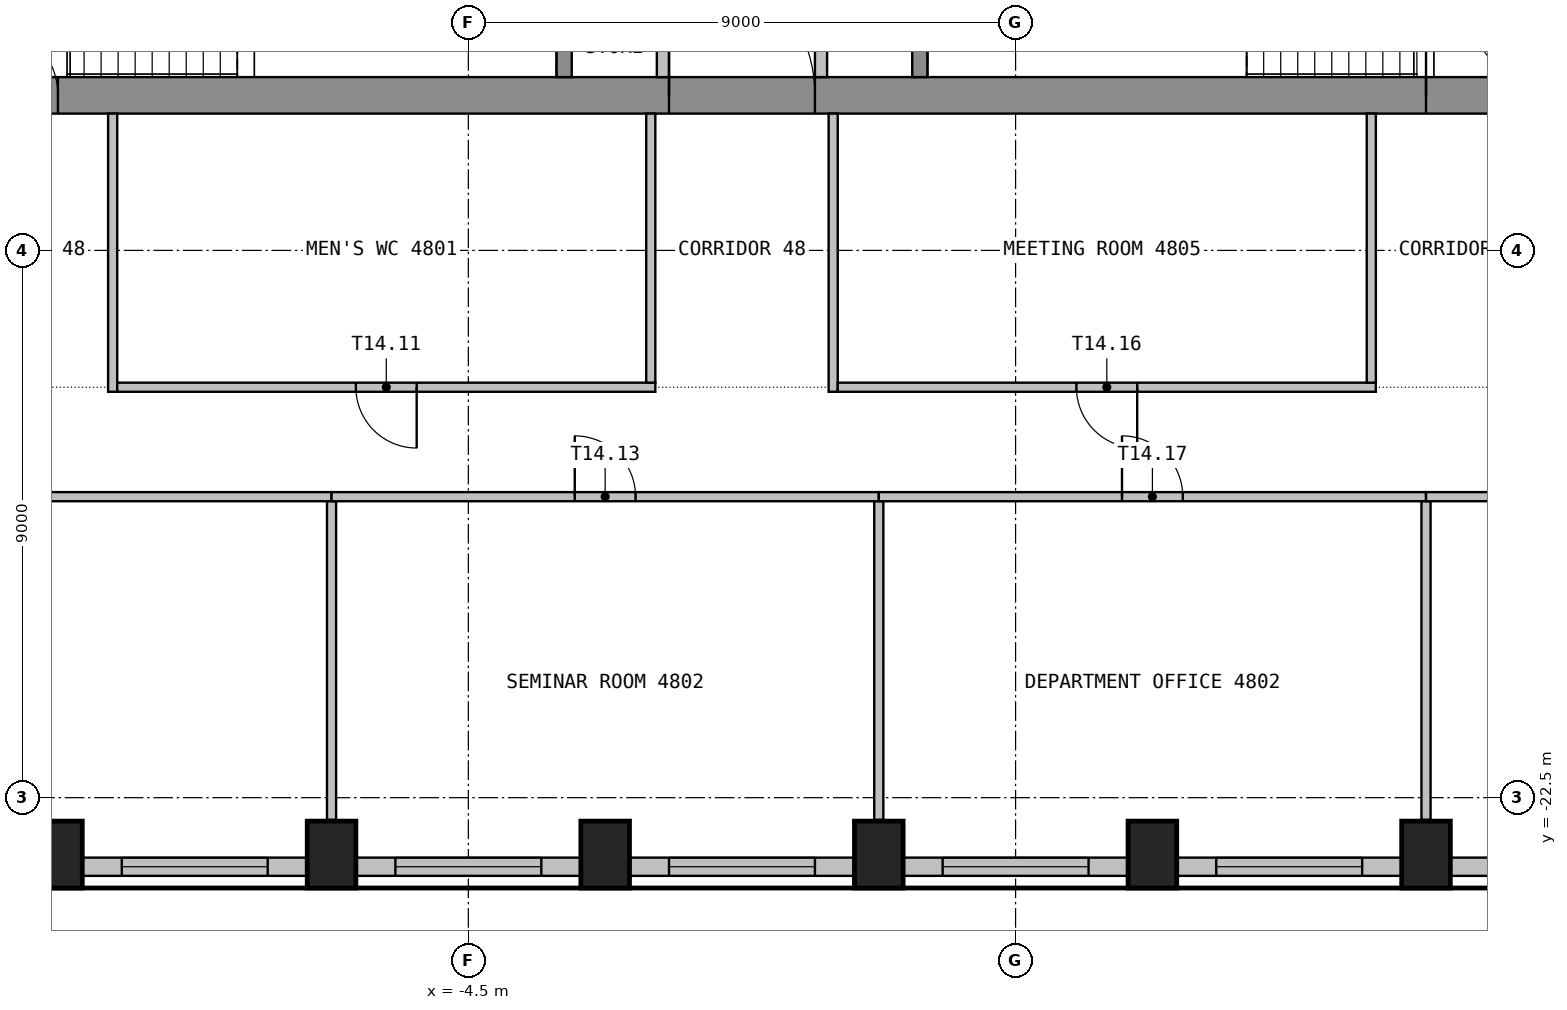
"""IFC4 building model, lengths in metres.
Left out: names, types, materials, properties, quantities, classifications, styles, units other than length and angle.
Written with IfcOpenShell. Run it as: python <this file> out.ifc"""

import sys

from ifc_helpers import new_model, si_unit, direction, frame, frame_2d, origin, origin_2d, place, context, subcontext, project, spatial, rectangle, extrude, element, fill, save


model = new_model("IFC4")
c1 = context("Model", 3, precision=1e-05, world=origin(), true_north=direction((0.0, 1.0)))
c2 = subcontext(c1, "Body", "Model", "MODEL_VIEW")
j1 = project(units=[si_unit("LENGTHUNIT", "METRE"), si_unit("PLANEANGLEUNIT", "RADIAN")], contexts=[c1])
p1 = place(None, origin())
s1 = spatial("IfcSite", under=j1, at=p1, CompositionType="ELEMENT")
p2 = place(p1, origin())
s2 = spatial("IfcBuilding", under=s1, at=p2, CompositionType="ELEMENT")
p3 = place(p2, frame((0.0, 0.0, 195.6)))
s3 = spatial("IfcBuildingStorey", under=s2, at=p3, CompositionType="ELEMENT", Elevation=195.6)
for number, where, z_axis, x_axis in (
    (1, (-11.25, -23.436, 0.0), (0.0, 0.0, 1.0), (1.0, 0.0, 0.0)),
    (2, (-6.75, -23.436, 0.0), (0.0, 0.0, 1.0), (1.0, 0.0, 0.0)),
    (3, (-2.25, -23.436, 0.0), (0.0, 0.0, 1.0), (1.0, 0.0, 0.0)),
    (4, (2.25, -23.436, 0.0), (0.0, 0.0, 1.0), (1.0, 0.0, 0.0)),
    (5, (6.75, -23.436, 0.0), (0.0, 0.0, 1.0), (1.0, 0.0, 0.0)),
    (6, (11.25, -23.436, 0.0), (0.0, 0.0, 1.0), (1.0, 0.0, 0.0)),
):
    element("IfcColumn", number, at=place(p3, frame(where, z_axis=z_axis, x_axis=x_axis)), inside=s3, PredefinedType="COLUMN", context=c2, shape_type="SweptSolid", body=[
        extrude(rectangle(XDim=0.8, YDim=1.1, at=origin_2d()), origin(), (0.0, 0.0, 1.0), 3.55),
    ])
p4 = place(p3, frame((-10.85, -23.635, 0.0), z_axis=(0.0, 0.0, 1.0), x_axis=(1.0, 0.0, 0.0)))
e7 = element("IfcWall", 7, at=p4, inside=s3, PredefinedType="SOLIDWALL", context=c2, shape_type="SweptSolid", body=[
    extrude(rectangle(XDim=3.699, YDim=0.3, at=frame_2d((1.85, 0.0))), origin(), (0.0, 0.0, 1.0), 3.55),
])
p5 = place(p4, frame((0.649, 0.0, 0.9)))
e8 = element("IfcOpeningElement", 8, at=p5, cuts=e7, PredefinedType="OPENING", context=c2, shape_type="SweptSolid", body=[
    extrude(rectangle(XDim=2.4, YDim=2.1, at=frame_2d((1.2, 1.05))), frame((0.0, 0.16, 0.0), z_axis=(0.0, -1.0, 0.0), x_axis=(1.0, 0.0, 0.0)), (0.0, 0.0, 1.0), 0.32),
])
p6 = place(p3, frame((-6.35, -23.635, 0.0), z_axis=(0.0, 0.0, 1.0), x_axis=(1.0, 0.0, 0.0)))
e9 = element("IfcWall", 9, at=p6, inside=s3, PredefinedType="SOLIDWALL", context=c2, shape_type="SweptSolid", body=[
    extrude(rectangle(XDim=3.699, YDim=0.3, at=frame_2d((1.85, 0.0))), origin(), (0.0, 0.0, 1.0), 3.55),
])
p7 = place(p6, frame((0.649, 0.0, 0.9)))
e10 = element("IfcOpeningElement", 10, at=p7, cuts=e9, PredefinedType="OPENING", context=c2, shape_type="SweptSolid", body=[
    extrude(rectangle(XDim=2.4, YDim=2.1, at=frame_2d((1.2, 1.05))), frame((0.0, 0.16, 0.0), z_axis=(0.0, -1.0, 0.0), x_axis=(1.0, 0.0, 0.0)), (0.0, 0.0, 1.0), 0.32),
])
p8 = place(p3, frame((-1.85, -23.635, 0.0), z_axis=(0.0, 0.0, 1.0), x_axis=(1.0, 0.0, 0.0)))
e11 = element("IfcWall", 11, at=p8, inside=s3, PredefinedType="SOLIDWALL", context=c2, shape_type="SweptSolid", body=[
    extrude(rectangle(XDim=3.699, YDim=0.3, at=frame_2d((1.85, 0.0))), origin(), (0.0, 0.0, 1.0), 3.55),
])
p9 = place(p8, frame((0.649, 0.0, 0.9)))
e12 = element("IfcOpeningElement", 12, at=p9, cuts=e11, PredefinedType="OPENING", context=c2, shape_type="SweptSolid", body=[
    extrude(rectangle(XDim=2.4, YDim=2.1, at=frame_2d((1.2, 1.05))), frame((0.0, 0.16, 0.0), z_axis=(0.0, -1.0, 0.0), x_axis=(1.0, 0.0, 0.0)), (0.0, 0.0, 1.0), 0.32),
])
p10 = place(p3, frame((2.65, -23.635, 0.0), z_axis=(0.0, 0.0, 1.0), x_axis=(1.0, 0.0, 0.0)))
e13 = element("IfcWall", 13, at=p10, inside=s3, PredefinedType="SOLIDWALL", context=c2, shape_type="SweptSolid", body=[
    extrude(rectangle(XDim=3.699, YDim=0.3, at=frame_2d((1.85, 0.0))), origin(), (0.0, 0.0, 1.0), 3.55),
])
p11 = place(p10, frame((0.649, 0.0, 0.9)))
e14 = element("IfcOpeningElement", 14, at=p11, cuts=e13, PredefinedType="OPENING", context=c2, shape_type="SweptSolid", body=[
    extrude(rectangle(XDim=2.4, YDim=2.1, at=frame_2d((1.2, 1.05))), frame((0.0, 0.16, 0.0), z_axis=(0.0, -1.0, 0.0), x_axis=(1.0, 0.0, 0.0)), (0.0, 0.0, 1.0), 0.32),
])
p12 = place(p3, frame((7.15, -23.635, 0.0), z_axis=(0.0, 0.0, 1.0), x_axis=(1.0, 0.0, 0.0)))
e15 = element("IfcWall", 15, at=p12, inside=s3, PredefinedType="SOLIDWALL", context=c2, shape_type="SweptSolid", body=[
    extrude(rectangle(XDim=3.699, YDim=0.3, at=frame_2d((1.85, 0.0))), origin(), (0.0, 0.0, 1.0), 3.55),
])
p13 = place(p12, frame((0.649, 0.0, 0.9)))
e16 = element("IfcOpeningElement", 16, at=p13, cuts=e15, PredefinedType="OPENING", context=c2, shape_type="SweptSolid", body=[
    extrude(rectangle(XDim=2.4, YDim=2.1, at=frame_2d((1.2, 1.05))), frame((0.0, 0.16, 0.0), z_axis=(0.0, -1.0, 0.0), x_axis=(1.0, 0.0, 0.0)), (0.0, 0.0, 1.0), 0.32),
])
p14 = place(p3, frame((11.65, -23.635, 0.0), z_axis=(0.0, 0.0, 1.0), x_axis=(1.0, 0.0, 0.0)))
e17 = element("IfcWall", 17, at=p14, inside=s3, PredefinedType="SOLIDWALL", context=c2, shape_type="SweptSolid", body=[
    extrude(rectangle(XDim=3.396, YDim=0.3, at=frame_2d((1.698, 0.0))), origin(), (0.0, 0.0, 1.0), 3.55),
])
p15 = place(p14, frame((0.649, 0.0, 0.9)))
e18 = element("IfcOpeningElement", 18, at=p15, cuts=e17, PredefinedType="OPENING", context=c2, shape_type="SweptSolid", body=[
    extrude(rectangle(XDim=2.4, YDim=2.1, at=frame_2d((1.2, 1.05))), frame((0.0, 0.16, 0.0), z_axis=(0.0, -1.0, 0.0), x_axis=(1.0, 0.0, 0.0)), (0.0, 0.0, 1.0), 0.32),
])
p16 = place(p3, frame((-13.5, -10.95, 0.0), z_axis=(0.0, 0.0, 1.0), x_axis=(1.0, 0.0, 0.0)))
e19 = element("IfcWall", 19, at=p16, inside=s3, PredefinedType="SHEAR", context=c2, shape_type="SweptSolid", body=[
    extrude(rectangle(XDim=27.0, YDim=0.6, at=frame_2d((13.5, 0.0))), origin(), (0.0, 0.0, 1.0), 3.55),
])
p17 = place(p16, frame((12.3, 0.0, 0.0)))
e20 = element("IfcOpeningElement", 20, at=p17, cuts=e19, PredefinedType="OPENING", context=c2, shape_type="SweptSolid", body=[
    extrude(rectangle(XDim=2.4, YDim=2.1, at=frame_2d((1.2, 1.05))), frame((0.0, 0.31, 0.0), z_axis=(0.0, -1.0, 0.0), x_axis=(1.0, 0.0, 0.0)), (0.0, 0.0, 1.0), 0.62),
])
p18 = place(p16, frame((1.05, 0.0, 0.0)))
e21 = element("IfcOpeningElement", 21, at=p18, cuts=e19, PredefinedType="OPENING", context=c2, shape_type="SweptSolid", body=[
    extrude(rectangle(XDim=1.2, YDim=2.1, at=frame_2d((0.6, 1.05))), frame((0.0, 0.31, 0.0), z_axis=(0.0, -1.0, 0.0), x_axis=(1.0, 0.0, 0.0)), (0.0, 0.0, 1.0), 0.62),
])
p19 = place(p16, frame((24.75, 0.0, 0.0)))
e22 = element("IfcOpeningElement", 22, at=p19, cuts=e19, PredefinedType="OPENING", context=c2, shape_type="SweptSolid", body=[
    extrude(rectangle(XDim=1.2, YDim=2.1, at=frame_2d((0.6, 1.05))), frame((0.0, 0.31, 0.0), z_axis=(0.0, -1.0, 0.0), x_axis=(1.0, 0.0, 0.0)), (0.0, 0.0, 1.0), 0.62),
])
for number, where, z_axis, x_axis in (
    (23, (-2.925, -10.65, 0.0), (0.0, 0.0, 1.0), (0.0, 1.0, 0.0)),
    (24, (2.925, -10.65, 0.0), (0.0, 0.0, 1.0), (0.0, 1.0, 0.0)),
):
    element("IfcWall", number, at=place(p3, frame(where, z_axis=z_axis, x_axis=x_axis)), inside=s3, PredefinedType="SHEAR", context=c2, shape_type="SweptSolid", body=[
        extrude(rectangle(XDim=3.25, YDim=0.25, at=frame_2d((1.625, 0.0))), origin(), (0.0, 0.0, 1.0), 3.55),
    ])
p20 = place(p3, frame((-1.3, -10.65, 0.0), z_axis=(0.0, 0.0, 1.0), x_axis=(0.0, 1.0, 0.0)))
e25 = element("IfcWall", 25, at=p20, inside=s3, PredefinedType="PARTITIONING", context=c2, shape_type="SweptSolid", body=[
    extrude(rectangle(XDim=3.5, YDim=0.2, at=frame_2d((1.75, 0.0))), origin(), (0.0, 0.0, 1.0), 3.55),
])
p21 = place(p20, frame((1.2, 0.0, 0.0)))
e26 = element("IfcOpeningElement", 26, at=p21, cuts=e25, PredefinedType="OPENING", context=c2, shape_type="SweptSolid", body=[
    extrude(rectangle(XDim=0.9, YDim=2.1, at=frame_2d((0.45, 1.05))), frame((0.0, 0.11, 0.0), z_axis=(0.0, -1.0, 0.0), x_axis=(1.0, 0.0, 0.0)), (0.0, 0.0, 1.0), 0.22),
])
p22 = place(p3, frame((1.3, -10.65, 0.0), z_axis=(0.0, 0.0, 1.0), x_axis=(0.0, 1.0, 0.0)))
e27 = element("IfcWall", 27, at=p22, inside=s3, PredefinedType="PARTITIONING", context=c2, shape_type="SweptSolid", body=[
    extrude(rectangle(XDim=3.5, YDim=0.2, at=frame_2d((1.75, 0.0))), origin(), (0.0, 0.0, 1.0), 3.55),
])
p23 = place(p22, frame((1.2, 0.0, 0.0)))
e28 = element("IfcOpeningElement", 28, at=p23, cuts=e27, PredefinedType="OPENING", context=c2, shape_type="SweptSolid", body=[
    extrude(rectangle(XDim=0.9, YDim=2.1, at=frame_2d((0.45, 1.05))), frame((0.0, 0.11, 0.0), z_axis=(0.0, -1.0, 0.0), x_axis=(1.0, 0.0, 0.0)), (0.0, 0.0, 1.0), 0.22),
])
p24 = place(p3, frame((-19.725, -17.55, 0.0), z_axis=(0.0, 0.0, 1.0), x_axis=(1.0, 0.0, 0.0)))
e29 = element("IfcWall", 29, at=p24, inside=s3, PredefinedType="PARTITIONING", context=c2, shape_type="SweptSolid", body=[
    extrude(rectangle(XDim=12.975, YDim=0.15, at=frame_2d((6.488, 0.0))), origin(), (0.0, 0.0, 1.0), 3.55),
])
p25 = place(p24, frame((5.988, 0.0, 0.0)))
e30 = element("IfcOpeningElement", 30, at=p25, cuts=e29, PredefinedType="OPENING", context=c2, shape_type="SweptSolid", body=[
    extrude(rectangle(XDim=1.0, YDim=2.1, at=frame_2d((0.5, 1.05))), frame((0.0, 0.085, 0.0), z_axis=(0.0, -1.0, 0.0), x_axis=(1.0, 0.0, 0.0)), (0.0, 0.0, 1.0), 0.17),
])
p26 = place(p3, frame((-10.35, -15.825, 0.0), z_axis=(0.0, 0.0, 1.0), x_axis=(0.0, 1.0, 0.0)))
e31 = element("IfcWall", 31, at=p26, inside=s3, PredefinedType="PARTITIONING", context=c2, shape_type="SweptSolid", body=[
    extrude(rectangle(XDim=4.575, YDim=0.15, at=frame_2d((2.288, 0.0))), origin(), (0.0, 0.0, 1.0), 3.55),
])
p27 = place(p3, frame((-1.425, -15.75, 0.0), z_axis=(0.0, 0.0, 1.0), x_axis=(-1.0, 0.0, 0.0)))
e32 = element("IfcWall", 32, at=p27, inside=s3, PredefinedType="PARTITIONING", context=c2, shape_type="SweptSolid", body=[
    extrude(rectangle(XDim=8.85, YDim=0.15, at=frame_2d((4.425, 0.0))), origin(), (0.0, 0.0, 1.0), 3.55),
])
p28 = place(p27, frame((3.925, 0.0, 0.0)))
e33 = element("IfcOpeningElement", 33, at=p28, cuts=e32, PredefinedType="OPENING", context=c2, shape_type="SweptSolid", body=[
    extrude(rectangle(XDim=1.0, YDim=2.1, at=frame_2d((0.5, 1.05))), frame((0.0, 0.085, 0.0), z_axis=(0.0, -1.0, 0.0), x_axis=(1.0, 0.0, 0.0)), (0.0, 0.0, 1.0), 0.17),
])
p29 = place(p3, frame((-6.75, -17.625, 0.0), z_axis=(0.0, 0.0, 1.0), x_axis=(0.0, -1.0, 0.0)))
e34 = element("IfcWall", 34, at=p29, inside=s3, PredefinedType="PARTITIONING", context=c2, shape_type="SweptSolid", body=[
    extrude(rectangle(XDim=5.24, YDim=0.15, at=frame_2d((2.62, 0.0))), origin(), (0.0, 0.0, 1.0), 3.55),
])
p30 = place(p3, frame((-6.75, -17.55, 0.0), z_axis=(0.0, 0.0, 1.0), x_axis=(1.0, 0.0, 0.0)))
e35 = element("IfcWall", 35, at=p30, inside=s3, PredefinedType="PARTITIONING", context=c2, shape_type="SweptSolid", body=[
    extrude(rectangle(XDim=9.0, YDim=0.15, at=frame_2d((4.5, 0.0))), origin(), (0.0, 0.0, 1.0), 3.55),
])
p31 = place(p30, frame((4.0, 0.0, 0.0)))
e36 = element("IfcOpeningElement", 36, at=p31, cuts=e35, PredefinedType="OPENING", context=c2, shape_type="SweptSolid", body=[
    extrude(rectangle(XDim=1.0, YDim=2.1, at=frame_2d((0.5, 1.05))), frame((0.0, 0.085, 0.0), z_axis=(0.0, -1.0, 0.0), x_axis=(1.0, 0.0, 0.0)), (0.0, 0.0, 1.0), 0.17),
])
p32 = place(p3, frame((-1.5, -11.25, 0.0), z_axis=(0.0, 0.0, 1.0), x_axis=(0.0, -1.0, 0.0)))
e37 = element("IfcWall", 37, at=p32, inside=s3, PredefinedType="PARTITIONING", context=c2, shape_type="SweptSolid", body=[
    extrude(rectangle(XDim=4.425, YDim=0.15, at=frame_2d((2.212, 0.0))), origin(), (0.0, 0.0, 1.0), 3.55),
])
p33 = place(p3, frame((1.5, -15.825, 0.0), z_axis=(0.0, 0.0, 1.0), x_axis=(0.0, 1.0, 0.0)))
e38 = element("IfcWall", 38, at=p33, inside=s3, PredefinedType="PARTITIONING", context=c2, shape_type="SweptSolid", body=[
    extrude(rectangle(XDim=4.575, YDim=0.15, at=frame_2d((2.288, 0.0))), origin(), (0.0, 0.0, 1.0), 3.55),
])
p34 = place(p3, frame((10.425, -15.75, 0.0), z_axis=(0.0, 0.0, 1.0), x_axis=(-1.0, 0.0, 0.0)))
e39 = element("IfcWall", 39, at=p34, inside=s3, PredefinedType="PARTITIONING", context=c2, shape_type="SweptSolid", body=[
    extrude(rectangle(XDim=8.85, YDim=0.15, at=frame_2d((4.425, 0.0))), origin(), (0.0, 0.0, 1.0), 3.55),
])
p35 = place(p34, frame((3.925, 0.0, 0.0)))
e40 = element("IfcOpeningElement", 40, at=p35, cuts=e39, PredefinedType="OPENING", context=c2, shape_type="SweptSolid", body=[
    extrude(rectangle(XDim=1.0, YDim=2.1, at=frame_2d((0.5, 1.05))), frame((0.0, 0.085, 0.0), z_axis=(0.0, -1.0, 0.0), x_axis=(1.0, 0.0, 0.0)), (0.0, 0.0, 1.0), 0.17),
])
p36 = place(p3, frame((2.25, -17.625, 0.0), z_axis=(0.0, 0.0, 1.0), x_axis=(0.0, -1.0, 0.0)))
e41 = element("IfcWall", 41, at=p36, inside=s3, PredefinedType="PARTITIONING", context=c2, shape_type="SweptSolid", body=[
    extrude(rectangle(XDim=5.24, YDim=0.15, at=frame_2d((2.62, 0.0))), origin(), (0.0, 0.0, 1.0), 3.55),
])
p37 = place(p3, frame((2.25, -17.55, 0.0), z_axis=(0.0, 0.0, 1.0), x_axis=(1.0, 0.0, 0.0)))
e42 = element("IfcWall", 42, at=p37, inside=s3, PredefinedType="PARTITIONING", context=c2, shape_type="SweptSolid", body=[
    extrude(rectangle(XDim=9.0, YDim=0.15, at=frame_2d((4.5, 0.0))), origin(), (0.0, 0.0, 1.0), 3.55),
])
p38 = place(p37, frame((4.0, 0.0, 0.0)))
e43 = element("IfcOpeningElement", 43, at=p38, cuts=e42, PredefinedType="OPENING", context=c2, shape_type="SweptSolid", body=[
    extrude(rectangle(XDim=1.0, YDim=2.1, at=frame_2d((0.5, 1.05))), frame((0.0, 0.085, 0.0), z_axis=(0.0, -1.0, 0.0), x_axis=(1.0, 0.0, 0.0)), (0.0, 0.0, 1.0), 0.17),
])
p39 = place(p3, frame((10.35, -11.25, 0.0), z_axis=(0.0, 0.0, 1.0), x_axis=(0.0, -1.0, 0.0)))
e44 = element("IfcWall", 44, at=p39, inside=s3, PredefinedType="PARTITIONING", context=c2, shape_type="SweptSolid", body=[
    extrude(rectangle(XDim=4.425, YDim=0.15, at=frame_2d((2.212, 0.0))), origin(), (0.0, 0.0, 1.0), 3.55),
])
p40 = place(p3, frame((11.25, -17.625, 0.0), z_axis=(0.0, 0.0, 1.0), x_axis=(0.0, -1.0, 0.0)))
e45 = element("IfcWall", 45, at=p40, inside=s3, PredefinedType="PARTITIONING", context=c2, shape_type="SweptSolid", body=[
    extrude(rectangle(XDim=5.24, YDim=0.15, at=frame_2d((2.62, 0.0))), origin(), (0.0, 0.0, 1.0), 3.55),
])
p41 = place(p3, frame((11.25, -17.55, 0.0), z_axis=(0.0, 0.0, 1.0), x_axis=(1.0, 0.0, 0.0)))
e46 = element("IfcWall", 46, at=p41, inside=s3, PredefinedType="PARTITIONING", context=c2, shape_type="SweptSolid", body=[
    extrude(rectangle(XDim=8.625, YDim=0.15, at=frame_2d((4.312, 0.0))), origin(), (0.0, 0.0, 1.0), 3.55),
])
p42 = place(p41, frame((3.812, 0.0, 0.0)))
e47 = element("IfcOpeningElement", 47, at=p42, cuts=e46, PredefinedType="OPENING", context=c2, shape_type="SweptSolid", body=[
    extrude(rectangle(XDim=1.0, YDim=2.1, at=frame_2d((0.5, 1.05))), frame((0.0, 0.085, 0.0), z_axis=(0.0, -1.0, 0.0), x_axis=(1.0, 0.0, 0.0)), (0.0, 0.0, 1.0), 0.17),
])
p43 = place(p5, origin())
e48 = element("IfcWindow", 48, at=p43, inside=s3, PartitioningType="SINGLE_PANEL", PredefinedType="WINDOW", context=c2, shape_type="SweptSolid", body=[
    extrude(rectangle(XDim=2.4, YDim=2.1, at=frame_2d((1.2, 1.05))), frame((0.0, 0.03, 0.0), z_axis=(0.0, -1.0, 0.0), x_axis=(1.0, 0.0, 0.0)), (0.0, 0.0, 1.0), 0.06),
])
fill(e8, e48)
p44 = place(p7, origin())
e49 = element("IfcWindow", 49, at=p44, inside=s3, PartitioningType="SINGLE_PANEL", PredefinedType="WINDOW", context=c2, shape_type="SweptSolid", body=[
    extrude(rectangle(XDim=2.4, YDim=2.1, at=frame_2d((1.2, 1.05))), frame((0.0, 0.03, 0.0), z_axis=(0.0, -1.0, 0.0), x_axis=(1.0, 0.0, 0.0)), (0.0, 0.0, 1.0), 0.06),
])
fill(e10, e49)
p45 = place(p9, origin())
e50 = element("IfcWindow", 50, at=p45, inside=s3, PartitioningType="SINGLE_PANEL", PredefinedType="WINDOW", context=c2, shape_type="SweptSolid", body=[
    extrude(rectangle(XDim=2.4, YDim=2.1, at=frame_2d((1.2, 1.05))), frame((0.0, 0.03, 0.0), z_axis=(0.0, -1.0, 0.0), x_axis=(1.0, 0.0, 0.0)), (0.0, 0.0, 1.0), 0.06),
])
fill(e12, e50)
p46 = place(p11, origin())
e51 = element("IfcWindow", 51, at=p46, inside=s3, PartitioningType="SINGLE_PANEL", PredefinedType="WINDOW", context=c2, shape_type="SweptSolid", body=[
    extrude(rectangle(XDim=2.4, YDim=2.1, at=frame_2d((1.2, 1.05))), frame((0.0, 0.03, 0.0), z_axis=(0.0, -1.0, 0.0), x_axis=(1.0, 0.0, 0.0)), (0.0, 0.0, 1.0), 0.06),
])
fill(e14, e51)
p47 = place(p13, origin())
e52 = element("IfcWindow", 52, at=p47, inside=s3, PartitioningType="SINGLE_PANEL", PredefinedType="WINDOW", context=c2, shape_type="SweptSolid", body=[
    extrude(rectangle(XDim=2.4, YDim=2.1, at=frame_2d((1.2, 1.05))), frame((0.0, 0.03, 0.0), z_axis=(0.0, -1.0, 0.0), x_axis=(1.0, 0.0, 0.0)), (0.0, 0.0, 1.0), 0.06),
])
fill(e16, e52)
p48 = place(p17, origin())
e53 = element("IfcDoor", 53, at=p48, inside=s3, OperationType="DOUBLE_DOOR_DOUBLE_SWING", PredefinedType="DOOR", context=c2, shape_type="SweptSolid", body=[
    extrude(rectangle(XDim=2.4, YDim=2.1, at=frame_2d((1.2, 1.05))), frame((0.0, 0.025, 0.0), z_axis=(0.0, -1.0, 0.0), x_axis=(1.0, 0.0, 0.0)), (0.0, 0.0, 1.0), 0.05),
])
fill(e20, e53)
p49 = place(p18, origin())
e54 = element("IfcDoor", 54, at=p49, inside=s3, OperationType="SINGLE_SWING_RIGHT", PredefinedType="DOOR", context=c2, shape_type="SweptSolid", body=[
    extrude(rectangle(XDim=1.2, YDim=2.1, at=frame_2d((0.6, 1.05))), frame((0.0, 0.025, 0.0), z_axis=(0.0, -1.0, 0.0), x_axis=(1.0, 0.0, 0.0)), (0.0, 0.0, 1.0), 0.05),
])
fill(e21, e54)
p50 = place(p19, origin())
e55 = element("IfcDoor", 55, at=p50, inside=s3, OperationType="SINGLE_SWING_RIGHT", PredefinedType="DOOR", context=c2, shape_type="SweptSolid", body=[
    extrude(rectangle(XDim=1.2, YDim=2.1, at=frame_2d((0.6, 1.05))), frame((0.0, 0.025, 0.0), z_axis=(0.0, -1.0, 0.0), x_axis=(1.0, 0.0, 0.0)), (0.0, 0.0, 1.0), 0.05),
])
fill(e22, e55)
p51 = place(p28, origin())
e56 = element("IfcDoor", 56, at=p51, inside=s3, OperationType="SINGLE_SWING_RIGHT", PredefinedType="DOOR", context=c2, shape_type="SweptSolid", body=[
    extrude(rectangle(XDim=1.0, YDim=2.1, at=frame_2d((0.5, 1.05))), frame((0.0, 0.025, 0.0), z_axis=(0.0, -1.0, 0.0), x_axis=(1.0, 0.0, 0.0)), (0.0, 0.0, 1.0), 0.05),
])
fill(e33, e56)
p52 = place(p31, origin())
e57 = element("IfcDoor", 57, at=p52, inside=s3, OperationType="SINGLE_SWING_LEFT", PredefinedType="DOOR", context=c2, shape_type="SweptSolid", body=[
    extrude(rectangle(XDim=1.0, YDim=2.1, at=frame_2d((0.5, 1.05))), frame((0.0, 0.025, 0.0), z_axis=(0.0, -1.0, 0.0), x_axis=(1.0, 0.0, 0.0)), (0.0, 0.0, 1.0), 0.05),
])
fill(e36, e57)
p53 = place(p35, origin())
e58 = element("IfcDoor", 58, at=p53, inside=s3, OperationType="SINGLE_SWING_RIGHT", PredefinedType="DOOR", context=c2, shape_type="SweptSolid", body=[
    extrude(rectangle(XDim=1.0, YDim=2.1, at=frame_2d((0.5, 1.05))), frame((0.0, 0.025, 0.0), z_axis=(0.0, -1.0, 0.0), x_axis=(1.0, 0.0, 0.0)), (0.0, 0.0, 1.0), 0.05),
])
fill(e40, e58)
p54 = place(p38, origin())
e59 = element("IfcDoor", 59, at=p54, inside=s3, OperationType="SINGLE_SWING_RIGHT", PredefinedType="DOOR", context=c2, shape_type="SweptSolid", body=[
    extrude(rectangle(XDim=1.0, YDim=2.1, at=frame_2d((0.5, 1.05))), frame((0.0, 0.025, 0.0), z_axis=(0.0, -1.0, 0.0), x_axis=(1.0, 0.0, 0.0)), (0.0, 0.0, 1.0), 0.05),
])
fill(e43, e59)
save(model, sys.argv[1])
